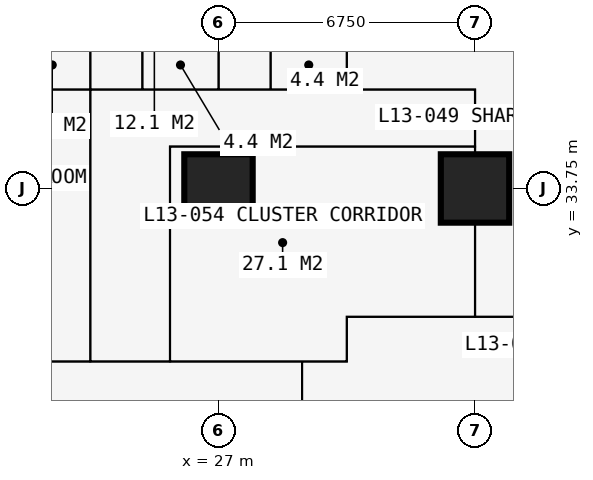
"""IFC4 building model, lengths in metres.
Left out: names, types, materials, properties, quantities, classifications, styles, units other than length and angle.
Written with IfcOpenShell. Run it as: python <this file> out.ifc"""

import sys

from ifc_helpers import new_model, si_unit, direction, frame, frame_2d, origin, origin_2d, place, context, subcontext, project, spatial, rectangle, extrude, element, fill, save


model = new_model("IFC4")
c1 = context("Model", 3, precision=1e-05, world=origin(), true_north=direction((0.0, 1.0)))
c2 = subcontext(c1, "Body", "Model", "MODEL_VIEW")
j1 = project(units=[si_unit("LENGTHUNIT", "METRE"), si_unit("PLANEANGLEUNIT", "RADIAN")], contexts=[c1])
p1 = place(None, origin())
s1 = spatial("IfcSite", under=j1, at=p1, CompositionType="ELEMENT")
p2 = place(p1, origin())
s2 = spatial("IfcBuilding", under=s1, at=p2, CompositionType="ELEMENT")
p3 = place(p2, frame((0.0, 0.0, 50.4)))
s3 = spatial("IfcBuildingStorey", under=s2, at=p3, CompositionType="ELEMENT", Elevation=50.4)
for number, where, z_axis, x_axis in (
    (1, (27.0, 33.75, 0.0), (0.0, 0.0, 1.0), (1.0, 0.0, 0.0)),
    (2, (33.75, 33.75, 0.0), (0.0, 0.0, 1.0), (1.0, 0.0, 0.0)),
):
    element("IfcColumn", number, at=place(p3, frame(where, z_axis=z_axis, x_axis=x_axis)), inside=s3, PredefinedType="COLUMN", context=c2, shape_type="SweptSolid", body=[
        extrude(rectangle(XDim=1.8, YDim=1.8, at=origin_2d()), origin(), (0.0, 0.0, 1.0), 3.6),
    ])
p4 = place(p3, frame((10.125, 36.35, 0.0), z_axis=(0.0, 0.0, 1.0), x_axis=(1.0, 0.0, 0.0)))
e3 = element("IfcWall", 3, at=p4, inside=s3, PredefinedType="PARTITIONING", context=c2, shape_type="SweptSolid", body=[
    extrude(rectangle(XDim=23.625, YDim=0.1, at=frame_2d((11.812, 0.0))), origin(), (0.0, 0.0, 1.0), 3.375),
])
p5 = place(p4, frame((21.45, 0.0, 0.0)))
e4 = element("IfcOpeningElement", 4, at=p5, cuts=e3, PredefinedType="OPENING", context=c2, shape_type="SweptSolid", body=[
    extrude(rectangle(XDim=1.0, YDim=2.2, at=frame_2d((0.5, 1.1))), frame((0.0, 0.06, 0.0), z_axis=(0.0, -1.0, 0.0), x_axis=(1.0, 0.0, 0.0)), (0.0, 0.0, 1.0), 0.12),
])
p6 = place(p4, frame((17.125, 0.0, 0.0)))
e5 = element("IfcOpeningElement", 5, at=p6, cuts=e3, PredefinedType="OPENING", context=c2, shape_type="SweptSolid", body=[
    extrude(rectangle(XDim=0.95, YDim=2.2, at=frame_2d((0.475, 1.1))), frame((0.0, 0.06, 0.0), z_axis=(0.0, -1.0, 0.0), x_axis=(1.0, 0.0, 0.0)), (0.0, 0.0, 1.0), 0.12),
])
p7 = place(p4, frame((13.7, 0.0, 0.0)))
e6 = element("IfcOpeningElement", 6, at=p7, cuts=e3, PredefinedType="OPENING", context=c2, shape_type="SweptSolid", body=[
    extrude(rectangle(XDim=0.95, YDim=2.2, at=frame_2d((0.475, 1.1))), frame((0.0, 0.06, 0.0), z_axis=(0.0, -1.0, 0.0), x_axis=(1.0, 0.0, 0.0)), (0.0, 0.0, 1.0), 0.12),
])
p8 = place(p4, frame((0.2, 0.0, 0.0)))
e7 = element("IfcOpeningElement", 7, at=p8, cuts=e3, PredefinedType="OPENING", context=c2, shape_type="SweptSolid", body=[
    extrude(rectangle(XDim=0.95, YDim=2.2, at=frame_2d((0.475, 1.1))), frame((0.0, 0.06, 0.0), z_axis=(0.0, -1.0, 0.0), x_axis=(1.0, 0.0, 0.0)), (0.0, 0.0, 1.0), 0.12),
])
p9 = place(p4, frame((3.625, 0.0, 0.0)))
e8 = element("IfcOpeningElement", 8, at=p9, cuts=e3, PredefinedType="OPENING", context=c2, shape_type="SweptSolid", body=[
    extrude(rectangle(XDim=0.95, YDim=2.2, at=frame_2d((0.475, 1.1))), frame((0.0, 0.06, 0.0), z_axis=(0.0, -1.0, 0.0), x_axis=(1.0, 0.0, 0.0)), (0.0, 0.0, 1.0), 0.12),
])
p10 = place(p4, frame((7.0, 0.0, 0.0)))
e9 = element("IfcOpeningElement", 9, at=p10, cuts=e3, PredefinedType="OPENING", context=c2, shape_type="SweptSolid", body=[
    extrude(rectangle(XDim=0.95, YDim=2.2, at=frame_2d((0.475, 1.1))), frame((0.0, 0.06, 0.0), z_axis=(0.0, -1.0, 0.0), x_axis=(1.0, 0.0, 0.0)), (0.0, 0.0, 1.0), 0.12),
])
p11 = place(p4, frame((10.375, 0.0, 0.0)))
e10 = element("IfcOpeningElement", 10, at=p11, cuts=e3, PredefinedType="OPENING", context=c2, shape_type="SweptSolid", body=[
    extrude(rectangle(XDim=0.95, YDim=2.2, at=frame_2d((0.475, 1.1))), frame((0.0, 0.06, 0.0), z_axis=(0.0, -1.0, 0.0), x_axis=(1.0, 0.0, 0.0)), (0.0, 0.0, 1.0), 0.12),
])
p12 = place(p3, frame((11.3, 29.2, 0.0), z_axis=(0.0, 0.0, 1.0), x_axis=(1.0, 0.0, 0.0)))
e11 = element("IfcWall", 11, at=p12, inside=s3, PredefinedType="PARTITIONING", context=c2, shape_type="SweptSolid", body=[
    extrude(rectangle(XDim=19.075, YDim=0.15, at=frame_2d((9.538, 0.0))), origin(), (0.0, 0.0, 1.0), 3.375),
])
p13 = place(p12, frame((12.875, 0.0, 0.0)))
e12 = element("IfcOpeningElement", 12, at=p13, cuts=e11, PredefinedType="OPENING", context=c2, shape_type="SweptSolid", body=[
    extrude(rectangle(XDim=1.0, YDim=2.2, at=frame_2d((0.5, 1.1))), frame((0.0, 0.085, 0.0), z_axis=(0.0, -1.0, 0.0), x_axis=(1.0, 0.0, 0.0)), (0.0, 0.0, 1.0), 0.17),
])
p14 = place(p12, frame((10.438, 0.0, 0.0)))
e13 = element("IfcOpeningElement", 13, at=p14, cuts=e11, PredefinedType="OPENING", context=c2, shape_type="SweptSolid", body=[
    extrude(rectangle(XDim=1.0, YDim=2.2, at=frame_2d((0.5, 1.1))), frame((0.0, 0.085, 0.0), z_axis=(0.0, -1.0, 0.0), x_axis=(1.0, 0.0, 0.0)), (0.0, 0.0, 1.0), 0.17),
])
p15 = place(p12, frame((15.675, 0.0, 0.0)))
e14 = element("IfcOpeningElement", 14, at=p15, cuts=e11, PredefinedType="OPENING", context=c2, shape_type="SweptSolid", body=[
    extrude(rectangle(XDim=0.95, YDim=2.2, at=frame_2d((0.475, 1.1))), frame((0.0, 0.085, 0.0), z_axis=(0.0, -1.0, 0.0), x_axis=(1.0, 0.0, 0.0)), (0.0, 0.0, 1.0), 0.17),
])
p16 = place(p3, frame((23.625, 29.2, 0.0), z_axis=(0.0, 0.0, 1.0), x_axis=(0.0, 1.0, 0.0)))
e15 = element("IfcWall", 15, at=p16, inside=s3, PredefinedType="PARTITIONING", context=c2, shape_type="SweptSolid", body=[
    extrude(rectangle(XDim=12.034, YDim=0.15, at=frame_2d((6.017, 0.0))), origin(), (0.0, 0.0, 1.0), 3.375),
])
p17 = place(p3, frame((25.0, 36.35, 0.0), z_axis=(0.0, 0.0, 1.0), x_axis=(0.0, 1.0, 0.0)))
e16 = element("IfcWall", 16, at=p17, inside=s3, PredefinedType="PARTITIONING", context=c2, shape_type="SweptSolid", body=[
    extrude(rectangle(XDim=2.2, YDim=0.1, at=frame_2d((1.1, 0.0))), origin(), (0.0, 0.0, 1.0), 3.375),
])
p18 = place(p3, frame((25.725, 29.2, 0.0), z_axis=(0.0, 0.0, 1.0), x_axis=(0.0, 1.0, 0.0)))
e17 = element("IfcWall", 17, at=p18, inside=s3, PredefinedType="PARTITIONING", context=c2, shape_type="SweptSolid", body=[
    extrude(rectangle(XDim=5.65, YDim=0.15, at=frame_2d((2.825, 0.0))), origin(), (0.0, 0.0, 1.0), 3.375),
])
p19 = place(p3, frame((25.725, 34.85, 0.0), z_axis=(0.0, 0.0, 1.0), x_axis=(1.0, 0.0, 0.0)))
e18 = element("IfcWall", 18, at=p19, inside=s3, PredefinedType="PARTITIONING", context=c2, shape_type="SweptSolid", body=[
    extrude(rectangle(XDim=8.025, YDim=0.15, at=frame_2d((4.012, 0.0))), origin(), (0.0, 0.0, 1.0), 3.375),
])
p20 = place(p3, frame((27.0, 36.35, 0.0), z_axis=(0.0, 0.0, 1.0), x_axis=(0.0, 1.0, 0.0)))
e19 = element("IfcWall", 19, at=p20, inside=s3, PredefinedType="PARTITIONING", context=c2, shape_type="SweptSolid", body=[
    extrude(rectangle(XDim=4.884, YDim=0.175, at=frame_2d((2.442, 0.0))), origin(), (0.0, 0.0, 1.0), 2.877),
])
p21 = place(p20, frame((0.65, 0.0, 0.0)))
e20 = element("IfcOpeningElement", 20, at=p21, cuts=e19, PredefinedType="OPENING", context=c2, shape_type="SweptSolid", body=[
    extrude(rectangle(XDim=0.9, YDim=2.2, at=frame_2d((0.45, 1.1))), frame((0.0, 0.097, 0.0), z_axis=(0.0, -1.0, 0.0), x_axis=(1.0, 0.0, 0.0)), (0.0, 0.0, 1.0), 0.195),
])
p22 = place(p3, frame((28.375, 36.35, 0.0), z_axis=(0.0, 0.0, 1.0), x_axis=(0.0, 1.0, 0.0)))
e21 = element("IfcWall", 21, at=p22, inside=s3, PredefinedType="PARTITIONING", context=c2, shape_type="SweptSolid", body=[
    extrude(rectangle(XDim=2.2, YDim=0.1, at=frame_2d((1.1, 0.0))), origin(), (0.0, 0.0, 1.0), 3.375),
])
p23 = place(p22, frame((0.65, 0.0, 0.0)))
e22 = element("IfcOpeningElement", 22, at=p23, cuts=e21, PredefinedType="OPENING", context=c2, shape_type="SweptSolid", body=[
    extrude(rectangle(XDim=0.9, YDim=2.2, at=frame_2d((0.45, 1.1))), frame((0.0, 0.06, 0.0), z_axis=(0.0, -1.0, 0.0), x_axis=(1.0, 0.0, 0.0)), (0.0, 0.0, 1.0), 0.12),
])
p24 = place(p3, frame((29.2, 11.3, 0.0), z_axis=(0.0, 0.0, 1.0), x_axis=(0.0, 1.0, 0.0)))
e23 = element("IfcWall", 23, at=p24, inside=s3, PredefinedType="PARTITIONING", context=c2, shape_type="SweptSolid", body=[
    extrude(rectangle(XDim=17.9, YDim=0.2, at=frame_2d((8.95, 0.0))), origin(), (0.0, 0.0, 1.0), 3.375),
])
p25 = place(p24, frame((8.35, 0.0, 0.0)))
e24 = element("IfcOpeningElement", 24, at=p25, cuts=e23, PredefinedType="OPENING", context=c2, shape_type="SweptSolid", body=[
    extrude(rectangle(XDim=1.2, YDim=2.2, at=frame_2d((0.6, 1.1))), frame((0.0, 0.11, 0.0), z_axis=(0.0, -1.0, 0.0), x_axis=(1.0, 0.0, 0.0)), (0.0, 0.0, 1.0), 0.22),
])
p26 = place(p3, frame((30.375, 29.2, 0.0), z_axis=(0.0, 0.0, 1.0), x_axis=(0.0, 1.0, 0.0)))
e25 = element("IfcWall", 25, at=p26, inside=s3, PredefinedType="PARTITIONING", context=c2, shape_type="SweptSolid", body=[
    extrude(rectangle(XDim=1.175, YDim=0.15, at=frame_2d((0.587, 0.0))), origin(), (0.0, 0.0, 1.0), 3.375),
])
p27 = place(p3, frame((30.375, 30.375, 0.0), z_axis=(0.0, 0.0, 1.0), x_axis=(1.0, 0.0, 0.0)))
e26 = element("IfcWall", 26, at=p27, inside=s3, PredefinedType="PARTITIONING", context=c2, shape_type="SweptSolid", body=[
    extrude(rectangle(XDim=10.859, YDim=0.15, at=frame_2d((5.429, 0.0))), origin(), (0.0, 0.0, 1.0), 3.375),
])
p28 = place(p3, frame((30.375, 36.35, 0.0), z_axis=(0.0, 0.0, 1.0), x_axis=(0.0, 1.0, 0.0)))
e27 = element("IfcWall", 27, at=p28, inside=s3, PredefinedType="PARTITIONING", context=c2, shape_type="SweptSolid", body=[
    extrude(rectangle(XDim=4.884, YDim=0.15, at=frame_2d((2.442, 0.0))), origin(), (0.0, 0.0, 1.0), 3.375),
])
p29 = place(p3, frame((33.75, 30.375, 0.0), z_axis=(0.0, 0.0, 1.0), x_axis=(0.0, 1.0, 0.0)))
e28 = element("IfcWall", 28, at=p29, inside=s3, PredefinedType="PARTITIONING", context=c2, shape_type="SweptSolid", body=[
    extrude(rectangle(XDim=5.975, YDim=0.15, at=frame_2d((2.988, 0.0))), origin(), (0.0, 0.0, 1.0), 2.877),
])
p30 = place(p5, origin())
e29 = element("IfcDoor", 29, at=p30, inside=s3, OperationType="SINGLE_SWING_LEFT", PredefinedType="DOOR", context=c2, shape_type="SweptSolid", body=[
    extrude(rectangle(XDim=1.0, YDim=2.2, at=frame_2d((0.5, 1.1))), frame((0.0, 0.025, 0.0), z_axis=(0.0, -1.0, 0.0), x_axis=(1.0, 0.0, 0.0)), (0.0, 0.0, 1.0), 0.05),
])
fill(e4, e29)
p31 = place(p6, origin())
e30 = element("IfcDoor", 30, at=p31, inside=s3, OperationType="SINGLE_SWING_LEFT", PredefinedType="DOOR", context=c2, shape_type="SweptSolid", body=[
    extrude(rectangle(XDim=0.95, YDim=2.2, at=frame_2d((0.475, 1.1))), frame((0.0, 0.025, 0.0), z_axis=(0.0, -1.0, 0.0), x_axis=(1.0, 0.0, 0.0)), (0.0, 0.0, 1.0), 0.05),
])
fill(e5, e30)
p32 = place(p23, origin())
e31 = element("IfcDoor", 31, at=p32, inside=s3, OperationType="SINGLE_SWING_RIGHT", PredefinedType="DOOR", context=c2, shape_type="SweptSolid", body=[
    extrude(rectangle(XDim=0.9, YDim=2.2, at=frame_2d((0.45, 1.1))), frame((0.0, 0.025, 0.0), z_axis=(0.0, -1.0, 0.0), x_axis=(1.0, 0.0, 0.0)), (0.0, 0.0, 1.0), 0.05),
])
fill(e22, e31)
p33 = place(p7, origin())
e32 = element("IfcDoor", 32, at=p33, inside=s3, OperationType="SINGLE_SWING_LEFT", PredefinedType="DOOR", context=c2, shape_type="SweptSolid", body=[
    extrude(rectangle(XDim=0.95, YDim=2.2, at=frame_2d((0.475, 1.1))), frame((0.0, 0.025, 0.0), z_axis=(0.0, -1.0, 0.0), x_axis=(1.0, 0.0, 0.0)), (0.0, 0.0, 1.0), 0.05),
])
fill(e6, e32)
p34 = place(p21, origin())
e33 = element("IfcDoor", 33, at=p34, inside=s3, OperationType="SINGLE_SWING_RIGHT", PredefinedType="DOOR", context=c2, shape_type="SweptSolid", body=[
    extrude(rectangle(XDim=0.9, YDim=2.2, at=frame_2d((0.45, 1.1))), frame((0.0, 0.025, 0.0), z_axis=(0.0, -1.0, 0.0), x_axis=(1.0, 0.0, 0.0)), (0.0, 0.0, 1.0), 0.05),
])
fill(e20, e33)
p35 = place(p13, origin())
e34 = element("IfcDoor", 34, at=p35, inside=s3, OperationType="SINGLE_SWING_LEFT", PredefinedType="DOOR", context=c2, shape_type="SweptSolid", body=[
    extrude(rectangle(XDim=1.0, YDim=2.2, at=frame_2d((0.5, 1.1))), frame((0.0, 0.025, 0.0), z_axis=(0.0, -1.0, 0.0), x_axis=(1.0, 0.0, 0.0)), (0.0, 0.0, 1.0), 0.05),
])
fill(e12, e34)
p36 = place(p14, origin())
e35 = element("IfcDoor", 35, at=p36, inside=s3, OperationType="SINGLE_SWING_LEFT", PredefinedType="DOOR", context=c2, shape_type="SweptSolid", body=[
    extrude(rectangle(XDim=1.0, YDim=2.2, at=frame_2d((0.5, 1.1))), frame((0.0, 0.025, 0.0), z_axis=(0.0, -1.0, 0.0), x_axis=(1.0, 0.0, 0.0)), (0.0, 0.0, 1.0), 0.05),
])
fill(e13, e35)
p37 = place(p15, origin())
e36 = element("IfcDoor", 36, at=p37, inside=s3, OperationType="SINGLE_SWING_LEFT", PredefinedType="DOOR", context=c2, shape_type="SweptSolid", body=[
    extrude(rectangle(XDim=0.95, YDim=2.2, at=frame_2d((0.475, 1.1))), frame((0.0, 0.025, 0.0), z_axis=(0.0, -1.0, 0.0), x_axis=(1.0, 0.0, 0.0)), (0.0, 0.0, 1.0), 0.05),
])
fill(e14, e36)
save(model, sys.argv[1])
